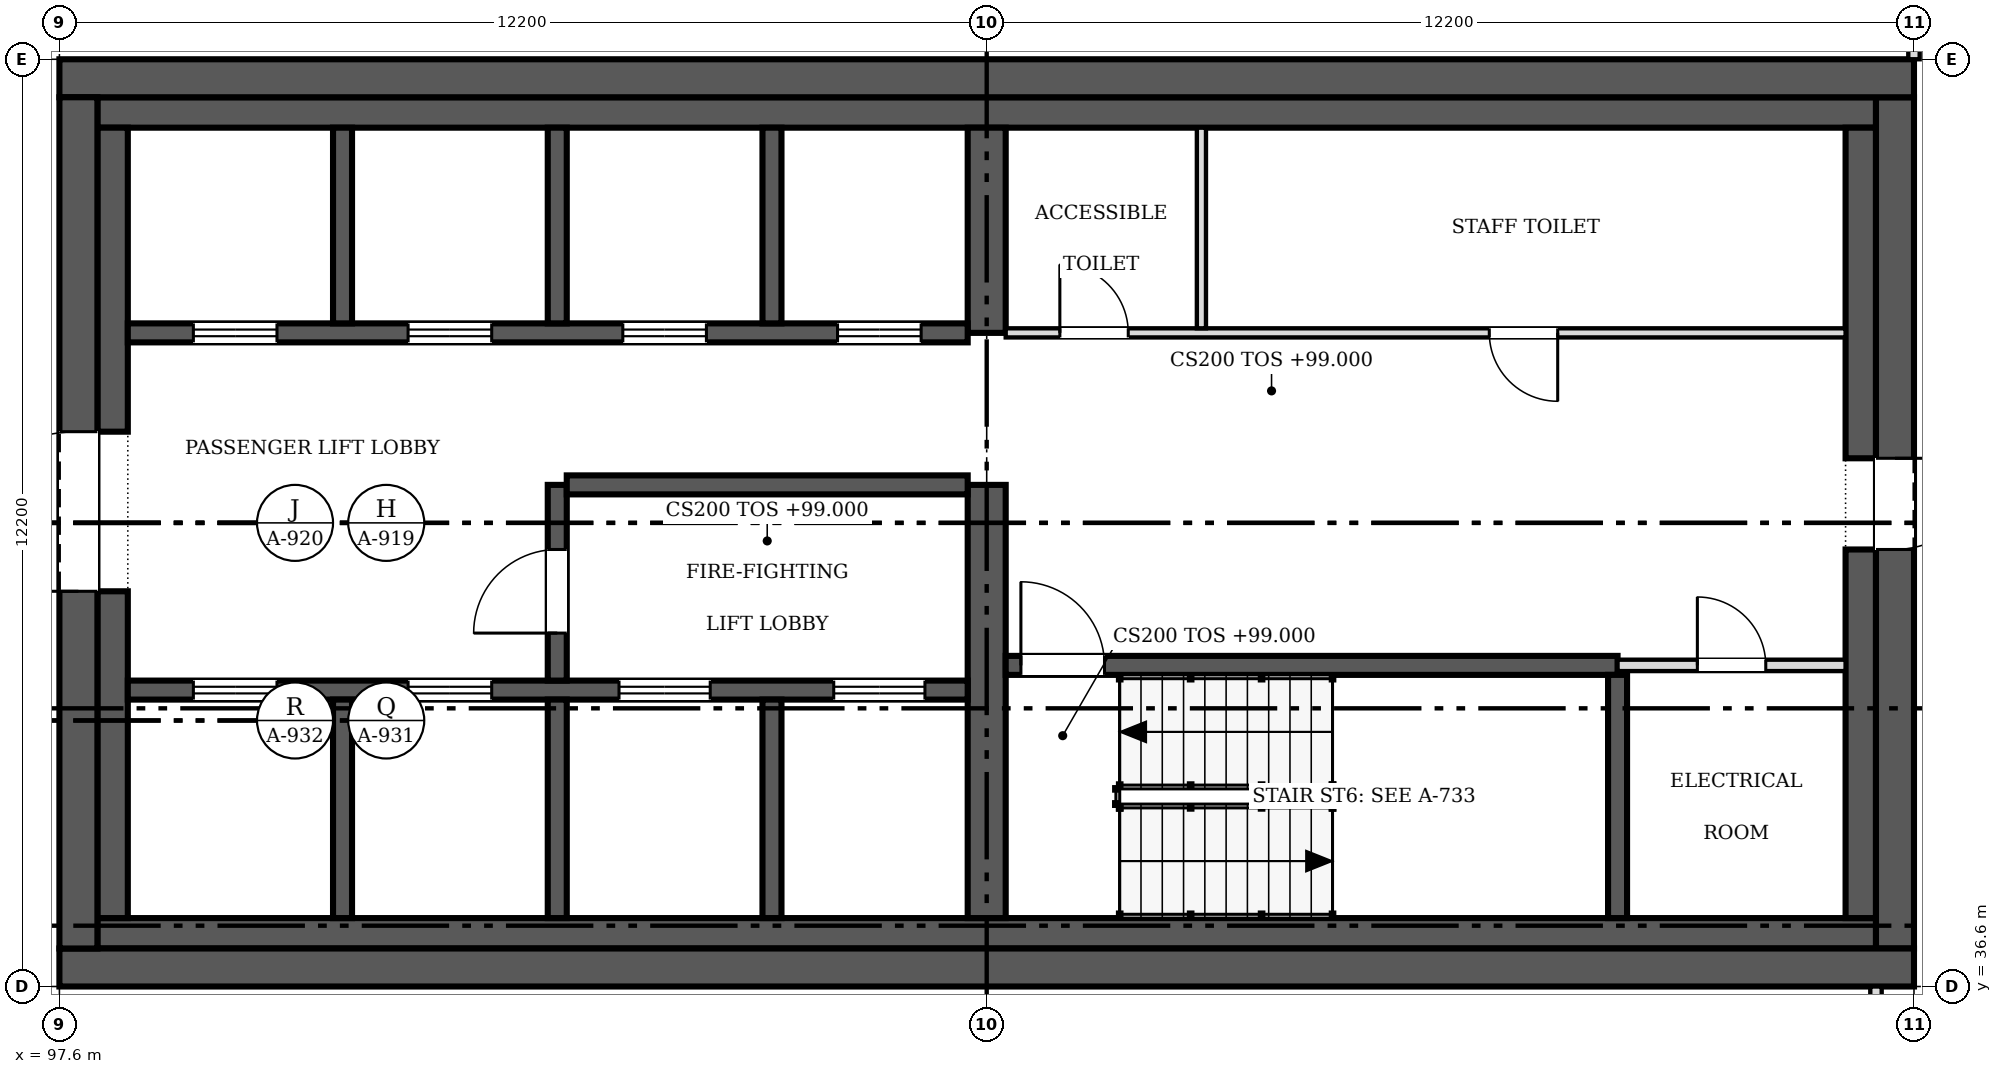
"""IFC4 building model, lengths in metres.
Left out: names, types, materials, properties, quantities, classifications, styles, units other than length and angle.
Written with IfcOpenShell. Run it as: python <this file> out.ifc"""

import sys

from ifc_helpers import new_model, si_unit, direction, frame, frame_2d, origin, place, context, subcontext, project, spatial, rectangle, extrude, source, transform, mapped, element, fill, save


model = new_model("IFC4")
c1 = context("Model", 3, precision=1e-05, world=origin(), true_north=direction((0.0, 1.0)))
c2 = subcontext(c1, "Body", "Model", "MODEL_VIEW")
j1 = project(units=[si_unit("LENGTHUNIT", "METRE"), si_unit("PLANEANGLEUNIT", "RADIAN")], contexts=[c1])
p1 = place(None, origin())
s1 = spatial("IfcSite", under=j1, at=p1, CompositionType="ELEMENT")
p2 = place(p1, origin())
s2 = spatial("IfcBuilding", under=s1, at=p2, CompositionType="ELEMENT")
p3 = place(p2, frame((0.0, 0.0, 99.0)))
s3 = spatial("IfcBuildingStorey", under=s2, at=p3, CompositionType="ELEMENT", Elevation=99.0)
p4 = place(p3, frame((122.0, 36.85, 0.0), z_axis=(0.0, 0.0, 1.0), x_axis=(-1.0, 0.0, 0.0)))
e1 = element("IfcWall", 1, at=p4, inside=s3, PredefinedType="SHEAR", context=c2, shape_type="SweptSolid", body=[
    extrude(rectangle(XDim=24.4, YDim=0.5, at=frame_2d((12.2, 0.0))), origin(), (0.0, 0.0, 1.0), 3.8),
])
p5 = place(p3, frame((97.85, 37.1, 0.0), z_axis=(0.0, 0.0, 1.0), x_axis=(0.0, 1.0, 0.0)))
e2 = element("IfcWall", 2, at=p5, inside=s3, PredefinedType="SHEAR", context=c2, shape_type="SweptSolid", body=[
    extrude(rectangle(XDim=11.2, YDim=0.5, at=frame_2d((5.6, 0.0))), origin(), (0.0, 0.0, 1.0), 3.8),
])
m1 = source(origin(), c2, "Body", "SweptSolid", [
    extrude(rectangle(XDim=2.1, YDim=2.4, at=frame_2d((1.05, 1.2))), frame((0.0, 0.26, 0.0), z_axis=(0.0, -1.0, 0.0), x_axis=(1.0, 0.0, 0.0)), (0.0, 0.0, 1.0), 0.52),
])
p6 = place(p5, frame((4.7, 0.0, 0.0)))
e3 = element("IfcOpeningElement", 3, at=p6, cuts=e2, PredefinedType="OPENING", context=c2, shape_type="MappedRepresentation", body=[
    mapped(m1, transform((0.0, 0.0, 0.0), scale=1.0)),
])
p7 = place(p3, frame((97.6, 48.55, 0.0), z_axis=(0.0, 0.0, 1.0), x_axis=(1.0, 0.0, 0.0)))
e4 = element("IfcWall", 4, at=p7, inside=s3, PredefinedType="SHEAR", context=c2, shape_type="SweptSolid", body=[
    extrude(rectangle(XDim=24.4, YDim=0.5, at=frame_2d((12.2, 0.0))), origin(), (0.0, 0.0, 1.0), 3.8),
])
p8 = place(p3, frame((121.75, 48.3, 0.0), z_axis=(0.0, 0.0, 1.0), x_axis=(0.0, -1.0, 0.0)))
e5 = element("IfcWall", 5, at=p8, inside=s3, PredefinedType="SHEAR", context=c2, shape_type="SweptSolid", body=[
    extrude(rectangle(XDim=11.2, YDim=0.5, at=frame_2d((5.6, 0.0))), origin(), (0.0, 0.0, 1.0), 3.8),
])
m2 = source(origin(), c2, "Body", "SweptSolid", [
    extrude(rectangle(XDim=1.2, YDim=2.1, at=frame_2d((0.6, 1.05))), frame((0.0, 0.26, 0.0), z_axis=(0.0, -1.0, 0.0), x_axis=(1.0, 0.0, 0.0)), (0.0, 0.0, 1.0), 0.52),
])
p9 = place(p8, frame((4.75, 0.0, 0.0)))
e6 = element("IfcOpeningElement", 6, at=p9, cuts=e5, PredefinedType="OPENING", context=c2, shape_type="MappedRepresentation", body=[
    mapped(m2, transform((0.0, 0.0, 0.0), scale=1.0)),
])
for number, where, z_axis, x_axis in (
    (7, (98.1, 37.3, 0.0), (0.0, 0.0, 1.0), (1.0, 0.0, 0.0)),
    (8, (98.1, 48.1, 0.0), (0.0, 0.0, 1.0), (1.0, 0.0, 0.0)),
):
    element("IfcWall", number, at=place(p3, frame(where, z_axis=z_axis, x_axis=x_axis)), inside=s3, PredefinedType="SOLIDWALL", context=c2, shape_type="SweptSolid", body=[
        extrude(rectangle(XDim=23.4, YDim=0.4, at=frame_2d((11.7, 0.0))), origin(), (0.0, 0.0, 1.0), 3.8),
    ])
p10 = place(p3, frame((98.3, 37.5, 0.0), z_axis=(0.0, 0.0, 1.0), x_axis=(0.0, 1.0, 0.0)))
e9 = element("IfcWall", 9, at=p10, inside=s3, PredefinedType="SOLIDWALL", context=c2, shape_type="SweptSolid", body=[
    extrude(rectangle(XDim=4.3, YDim=0.4, at=frame_2d((2.15, 0.0))), origin(), (0.0, 0.0, 1.0), 3.8),
])
p11 = place(p3, frame((98.3, 43.9, 0.0), z_axis=(0.0, 0.0, 1.0), x_axis=(0.0, 1.0, 0.0)))
e10 = element("IfcWall", 10, at=p11, inside=s3, PredefinedType="SOLIDWALL", context=c2, shape_type="SweptSolid", body=[
    extrude(rectangle(XDim=4.0, YDim=0.4, at=frame_2d((2.0, 0.0))), origin(), (0.0, 0.0, 1.0), 3.8),
])
p12 = place(p3, frame((121.3, 37.5, 0.0), z_axis=(0.0, 0.0, 1.0), x_axis=(0.0, 1.0, 0.0)))
e11 = element("IfcWall", 11, at=p12, inside=s3, PredefinedType="SOLIDWALL", context=c2, shape_type="SweptSolid", body=[
    extrude(rectangle(XDim=4.85, YDim=0.4, at=frame_2d((2.425, 0.0))), origin(), (0.0, 0.0, 1.0), 3.8),
])
p13 = place(p3, frame((121.3, 43.55, 0.0), z_axis=(0.0, 0.0, 1.0), x_axis=(0.0, 1.0, 0.0)))
e12 = element("IfcWall", 12, at=p13, inside=s3, PredefinedType="SOLIDWALL", context=c2, shape_type="SweptSolid", body=[
    extrude(rectangle(XDim=4.35, YDim=0.4, at=frame_2d((2.175, 0.0))), origin(), (0.0, 0.0, 1.0), 3.8),
])
p14 = place(p3, frame((109.8, 37.5, 0.0), z_axis=(0.0, 0.0, 1.0), x_axis=(0.0, 1.0, 0.0)))
e13 = element("IfcWall", 13, at=p14, inside=s3, PredefinedType="SHEAR", context=c2, shape_type="SweptSolid", body=[
    extrude(rectangle(XDim=5.7, YDim=0.5, at=frame_2d((2.85, 0.0))), origin(), (0.0, 0.0, 1.0), 3.8),
])
p15 = place(p3, frame((109.8, 45.2, 0.0), z_axis=(0.0, 0.0, 1.0), x_axis=(0.0, 1.0, 0.0)))
e14 = element("IfcWall", 14, at=p15, inside=s3, PredefinedType="SHEAR", context=c2, shape_type="SweptSolid", body=[
    extrude(rectangle(XDim=2.7, YDim=0.5, at=frame_2d((1.35, 0.0))), origin(), (0.0, 0.0, 1.0), 3.8),
])
p16 = place(p3, frame((98.5, 40.5, 0.0), z_axis=(0.0, 0.0, 1.0), x_axis=(1.0, 0.0, 0.0)))
e15 = element("IfcWall", 15, at=p16, inside=s3, PredefinedType="SOLIDWALL", context=c2, shape_type="SweptSolid", body=[
    extrude(rectangle(XDim=11.05, YDim=0.25, at=frame_2d((5.525, 0.0))), origin(), (0.0, 0.0, 1.0), 3.8),
])
m3 = source(origin(), c2, "Body", "SweptSolid", [
    extrude(rectangle(XDim=1.1, YDim=2.1, at=frame_2d((0.55, 1.05))), frame((0.0, 0.135, 0.0), z_axis=(0.0, -1.0, 0.0), x_axis=(1.0, 0.0, 0.0)), (0.0, 0.0, 1.0), 0.27),
])
p17 = place(p16, frame((0.863, 0.0, 0.0)))
e16 = element("IfcOpeningElement", 16, at=p17, cuts=e15, PredefinedType="OPENING", context=c2, shape_type="MappedRepresentation", body=[
    mapped(m3, transform((0.0, 0.0, 0.0), scale=1.0)),
])
p18 = place(p16, frame((3.688, 0.0, 0.0)))
e17 = element("IfcOpeningElement", 17, at=p18, cuts=e15, PredefinedType="OPENING", context=c2, shape_type="MappedRepresentation", body=[
    mapped(m3, transform((0.0, 0.0, 0.0), scale=1.0)),
])
m4 = source(origin(), c2, "Body", "SweptSolid", [
    extrude(rectangle(XDim=1.2, YDim=2.1, at=frame_2d((0.6, 1.05))), frame((0.0, 0.135, 0.0), z_axis=(0.0, -1.0, 0.0), x_axis=(1.0, 0.0, 0.0)), (0.0, 0.0, 1.0), 0.27),
])
p19 = place(p16, frame((6.462, 0.0, 0.0)))
e18 = element("IfcOpeningElement", 18, at=p19, cuts=e15, PredefinedType="OPENING", context=c2, shape_type="MappedRepresentation", body=[
    mapped(m4, transform((0.0, 0.0, 0.0), scale=1.0)),
])
p20 = place(p16, frame((9.288, 0.0, 0.0)))
e19 = element("IfcOpeningElement", 19, at=p20, cuts=e15, PredefinedType="OPENING", context=c2, shape_type="MappedRepresentation", body=[
    mapped(m4, transform((0.0, 0.0, 0.0), scale=1.0)),
])
p21 = place(p3, frame((109.55, 45.2, 0.0), z_axis=(0.0, 0.0, 1.0), x_axis=(-1.0, 0.0, 0.0)))
e20 = element("IfcWall", 20, at=p21, inside=s3, PredefinedType="SOLIDWALL", context=c2, shape_type="SweptSolid", body=[
    extrude(rectangle(XDim=11.05, YDim=0.25, at=frame_2d((5.525, 0.0))), origin(), (0.0, 0.0, 1.0), 3.8),
])
p22 = place(p21, frame((9.087, 0.0, 0.0)))
e21 = element("IfcOpeningElement", 21, at=p22, cuts=e20, PredefinedType="OPENING", context=c2, shape_type="MappedRepresentation", body=[
    mapped(m3, transform((0.0, 0.0, 0.0), scale=1.0)),
])
p23 = place(p21, frame((6.262, 0.0, 0.0)))
e22 = element("IfcOpeningElement", 22, at=p23, cuts=e20, PredefinedType="OPENING", context=c2, shape_type="MappedRepresentation", body=[
    mapped(m3, transform((0.0, 0.0, 0.0), scale=1.0)),
])
p24 = place(p21, frame((3.438, 0.0, 0.0)))
e23 = element("IfcOpeningElement", 23, at=p24, cuts=e20, PredefinedType="OPENING", context=c2, shape_type="MappedRepresentation", body=[
    mapped(m3, transform((0.0, 0.0, 0.0), scale=1.0)),
])
p25 = place(p21, frame((0.613, 0.0, 0.0)))
e24 = element("IfcOpeningElement", 24, at=p25, cuts=e20, PredefinedType="OPENING", context=c2, shape_type="MappedRepresentation", body=[
    mapped(m3, transform((0.0, 0.0, 0.0), scale=1.0)),
])
p26 = place(p3, frame((118.1, 40.825, 0.0), z_axis=(0.0, 0.0, 1.0), x_axis=(-1.0, 0.0, 0.0)))
e25 = element("IfcWall", 25, at=p26, inside=s3, PredefinedType="SOLIDWALL", context=c2, shape_type="SweptSolid", body=[
    extrude(rectangle(XDim=8.05, YDim=0.25, at=frame_2d((4.025, 0.0))), origin(), (0.0, 0.0, 1.0), 3.8),
])
p27 = place(p26, frame((6.75, 0.0, 0.0)))
e26 = element("IfcOpeningElement", 26, at=p27, cuts=e25, PredefinedType="OPENING", context=c2, shape_type="MappedRepresentation", body=[
    mapped(m3, transform((0.0, 0.0, 0.0), scale=1.0)),
])
p28 = place(p3, frame((104.15, 37.5, 0.0), z_axis=(0.0, 0.0, 1.0), x_axis=(0.0, 1.0, 0.0)))
e27 = element("IfcWall", 27, at=p28, inside=s3, PredefinedType="SOLIDWALL", context=c2, shape_type="SweptSolid", body=[
    extrude(rectangle(XDim=2.875, YDim=0.25, at=frame_2d((1.438, 0.0))), origin(), (0.0, 0.0, 1.0), 3.8),
])
p29 = place(p3, frame((104.15, 43.2, 0.0), z_axis=(0.0, 0.0, 1.0), x_axis=(0.0, -1.0, 0.0)))
e28 = element("IfcWall", 28, at=p29, inside=s3, PredefinedType="SOLIDWALL", context=c2, shape_type="SweptSolid", body=[
    extrude(rectangle(XDim=2.575, YDim=0.25, at=frame_2d((1.288, 0.0))), origin(), (0.0, 0.0, 1.0), 3.8),
])
p30 = place(p29, frame((0.85, 0.0, 0.0)))
e29 = element("IfcOpeningElement", 29, at=p30, cuts=e28, PredefinedType="OPENING", context=c2, shape_type="MappedRepresentation", body=[
    mapped(m3, transform((0.0, 0.0, 0.0), scale=1.0)),
])
p31 = place(p3, frame((104.275, 43.2, 0.0), z_axis=(0.0, 0.0, 1.0), x_axis=(1.0, 0.0, 0.0)))
e30 = element("IfcWall", 30, at=p31, inside=s3, PredefinedType="SOLIDWALL", context=c2, shape_type="SweptSolid", body=[
    extrude(rectangle(XDim=5.275, YDim=0.25, at=frame_2d((2.638, 0.0))), origin(), (0.0, 0.0, 1.0), 3.8),
])
p32 = place(p3, frame((118.1, 37.5, 0.0), z_axis=(0.0, 0.0, 1.0), x_axis=(0.0, 1.0, 0.0)))
e31 = element("IfcWall", 31, at=p32, inside=s3, PredefinedType="SOLIDWALL", context=c2, shape_type="SweptSolid", body=[
    extrude(rectangle(XDim=3.2, YDim=0.25, at=frame_2d((1.6, 0.0))), origin(), (0.0, 0.0, 1.0), 3.8),
])
for number, where, z_axis, x_axis in (
    (32, (101.325, 37.5, 0.0), (0.0, 0.0, 1.0), (0.0, 1.0, 0.0)),
    (33, (106.975, 37.5, 0.0), (0.0, 0.0, 1.0), (0.0, 1.0, 0.0)),
):
    element("IfcWall", number, at=place(p3, frame(where, z_axis=z_axis, x_axis=x_axis)), inside=s3, PredefinedType="SOLIDWALL", context=c2, shape_type="SweptSolid", body=[
        extrude(rectangle(XDim=2.875, YDim=0.25, at=frame_2d((1.438, 0.0))), origin(), (0.0, 0.0, 1.0), 3.8),
    ])
for number, where, z_axis, x_axis in (
    (34, (101.325, 45.325, 0.0), (0.0, 0.0, 1.0), (0.0, 1.0, 0.0)),
    (35, (104.15, 45.325, 0.0), (0.0, 0.0, 1.0), (0.0, 1.0, 0.0)),
    (36, (106.975, 45.325, 0.0), (0.0, 0.0, 1.0), (0.0, 1.0, 0.0)),
):
    element("IfcWall", number, at=place(p3, frame(where, z_axis=z_axis, x_axis=x_axis)), inside=s3, PredefinedType="SOLIDWALL", context=c2, shape_type="SweptSolid", body=[
        extrude(rectangle(XDim=2.575, YDim=0.25, at=frame_2d((1.288, 0.0))), origin(), (0.0, 0.0, 1.0), 3.8),
    ])
p33 = place(p3, frame((110.05, 45.2, 0.0), z_axis=(0.0, 0.0, 1.0), x_axis=(1.0, 0.0, 0.0)))
e37 = element("IfcWall", 37, at=p33, inside=s3, PredefinedType="PARTITIONING", context=c2, shape_type="SweptSolid", body=[
    extrude(rectangle(XDim=11.05, YDim=0.12, at=frame_2d((5.525, 0.0))), origin(), (0.0, 0.0, 1.0), 3.6),
])
m5 = source(origin(), c2, "Body", "SweptSolid", [
    extrude(rectangle(XDim=0.9, YDim=2.1, at=frame_2d((0.45, 1.05))), frame((0.0, 0.07, 0.0), z_axis=(0.0, -1.0, 0.0), x_axis=(1.0, 0.0, 0.0)), (0.0, 0.0, 1.0), 0.14),
])
p34 = place(p33, frame((0.712, 0.0, 0.0)))
e38 = element("IfcOpeningElement", 38, at=p34, cuts=e37, PredefinedType="OPENING", context=c2, shape_type="MappedRepresentation", body=[
    mapped(m5, transform((0.0, 0.0, 0.0), scale=1.0)),
])
p35 = place(p33, frame((6.363, 0.0, 0.0)))
e39 = element("IfcOpeningElement", 39, at=p35, cuts=e37, PredefinedType="OPENING", context=c2, shape_type="MappedRepresentation", body=[
    mapped(m5, transform((0.0, 0.0, 0.0), scale=1.0)),
])
p36 = place(p3, frame((121.1, 40.825, 0.0), z_axis=(0.0, 0.0, 1.0), x_axis=(-1.0, 0.0, 0.0)))
e40 = element("IfcWall", 40, at=p36, inside=s3, PredefinedType="PARTITIONING", context=c2, shape_type="SweptSolid", body=[
    extrude(rectangle(XDim=3.0, YDim=0.15, at=frame_2d((1.5, 0.0))), origin(), (0.0, 0.0, 1.0), 3.6),
])
m6 = source(origin(), c2, "Body", "SweptSolid", [
    extrude(rectangle(XDim=0.9, YDim=2.1, at=frame_2d((0.45, 1.05))), frame((0.0, 0.085, 0.0), z_axis=(0.0, -1.0, 0.0), x_axis=(1.0, 0.0, 0.0)), (0.0, 0.0, 1.0), 0.17),
])
p37 = place(p36, frame((1.05, 0.0, 0.0)))
e41 = element("IfcOpeningElement", 41, at=p37, cuts=e40, PredefinedType="OPENING", context=c2, shape_type="MappedRepresentation", body=[
    mapped(m6, transform((0.0, 0.0, 0.0), scale=1.0)),
])
p38 = place(p3, frame((112.625, 45.26, 0.0), z_axis=(0.0, 0.0, 1.0), x_axis=(0.0, 1.0, 0.0)))
e42 = element("IfcWall", 42, at=p38, inside=s3, PredefinedType="PARTITIONING", context=c2, shape_type="SweptSolid", body=[
    extrude(rectangle(XDim=2.64, YDim=0.12, at=frame_2d((1.32, 0.0))), origin(), (0.0, 0.0, 1.0), 3.6),
])
p39 = place(p3, frame((121.5, 36.6, 0.0), z_axis=(0.0, 0.0, 1.0), x_axis=(0.0, -1.0, 0.0)))
e43 = element("IfcWall", 43, at=p39, inside=s3, PredefinedType="PARTITIONING", context=c2, shape_type="SweptSolid", body=[
    extrude(rectangle(XDim=2.524, YDim=0.15, at=frame_2d((1.262, 0.0))), origin(), (0.0, 0.0, 1.0), 3.067),
])
m7 = source(origin(), c2, "Body", "SweptSolid", [
    extrude(rectangle(XDim=1.0, YDim=2.1, at=frame_2d((0.5, 1.05))), frame((0.0, 0.085, 0.0), z_axis=(0.0, -1.0, 0.0), x_axis=(1.0, 0.0, 0.0)), (0.0, 0.0, 1.0), 0.17),
])
p40 = place(p39, frame((0.724, 0.0, 0.0)))
e44 = element("IfcOpeningElement", 44, at=p40, cuts=e43, PredefinedType="OPENING", context=c2, shape_type="MappedRepresentation", body=[
    mapped(m7, transform((0.0, 0.0, 0.0), scale=1.0)),
])
p41 = place(p3, frame((122.0, 48.8, 0.0), z_axis=(0.0, 0.0, 1.0), x_axis=(0.0, 1.0, 0.0)))
e45 = element("IfcWall", 45, at=p41, inside=s3, PredefinedType="PARTITIONING", context=c2, shape_type="SweptSolid", body=[
    extrude(rectangle(XDim=2.324, YDim=0.15, at=frame_2d((1.162, 0.0))), origin(), (0.0, 0.0, 1.0), 3.067),
])
m8 = source(origin(), c2, "Body", "SweptSolid", [
    extrude(rectangle(XDim=2.1, YDim=2.4, at=frame_2d((1.05, 1.2))), frame((0.0, 0.025, 0.0), z_axis=(0.0, -1.0, 0.0), x_axis=(1.0, 0.0, 0.0)), (0.0, 0.0, 1.0), 0.05),
])
p42 = place(p6, origin())
e46 = element("IfcDoor", 46, at=p42, inside=s3, OperationType="DOUBLE_DOOR_SINGLE_SWING", PredefinedType="DOOR", context=c2, shape_type="MappedRepresentation", body=[
    mapped(m8, transform((0.0, 0.0, 0.0), scale=1.0)),
])
fill(e3, e46)
m9 = source(origin(), c2, "Body", "SweptSolid", [
    extrude(rectangle(XDim=1.2, YDim=2.1, at=frame_2d((0.6, 1.05))), frame((0.0, 0.025, 0.0), z_axis=(0.0, -1.0, 0.0), x_axis=(1.0, 0.0, 0.0)), (0.0, 0.0, 1.0), 0.05),
])
p43 = place(p9, origin())
e47 = element("IfcDoor", 47, at=p43, inside=s3, OperationType="SINGLE_SWING_LEFT", PredefinedType="DOOR", context=c2, shape_type="MappedRepresentation", body=[
    mapped(m9, transform((0.0, 0.0, 0.0), scale=1.0)),
])
fill(e6, e47)
m10 = source(origin(), c2, "Body", "SweptSolid", [
    extrude(rectangle(XDim=1.1, YDim=2.1, at=frame_2d((0.55, 1.05))), frame((0.0, 0.025, 0.0), z_axis=(0.0, -1.0, 0.0), x_axis=(1.0, 0.0, 0.0)), (0.0, 0.0, 1.0), 0.05),
])
p44 = place(p17, origin())
e48 = element("IfcDoor", 48, at=p44, inside=s3, OperationType="DOUBLE_DOOR_SLIDING", PredefinedType="DOOR", context=c2, shape_type="MappedRepresentation", body=[
    mapped(m10, transform((0.0, 0.0, 0.0), scale=1.0)),
])
fill(e16, e48)
p45 = place(p18, origin())
e49 = element("IfcDoor", 49, at=p45, inside=s3, OperationType="DOUBLE_DOOR_SLIDING", PredefinedType="DOOR", context=c2, shape_type="MappedRepresentation", body=[
    mapped(m10, transform((0.0, 0.0, 0.0), scale=1.0)),
])
fill(e17, e49)
p46 = place(p19, origin())
e50 = element("IfcDoor", 50, at=p46, inside=s3, OperationType="DOUBLE_DOOR_SLIDING", PredefinedType="DOOR", context=c2, shape_type="MappedRepresentation", body=[
    mapped(m9, transform((0.0, 0.0, 0.0), scale=1.0)),
])
fill(e18, e50)
p47 = place(p20, origin())
e51 = element("IfcDoor", 51, at=p47, inside=s3, OperationType="DOUBLE_DOOR_SLIDING", PredefinedType="DOOR", context=c2, shape_type="MappedRepresentation", body=[
    mapped(m9, transform((0.0, 0.0, 0.0), scale=1.0)),
])
fill(e19, e51)
p48 = place(p22, origin())
e52 = element("IfcDoor", 52, at=p48, inside=s3, OperationType="DOUBLE_DOOR_SLIDING", PredefinedType="DOOR", context=c2, shape_type="MappedRepresentation", body=[
    mapped(m10, transform((0.0, 0.0, 0.0), scale=1.0)),
])
fill(e21, e52)
p49 = place(p23, origin())
e53 = element("IfcDoor", 53, at=p49, inside=s3, OperationType="DOUBLE_DOOR_SLIDING", PredefinedType="DOOR", context=c2, shape_type="MappedRepresentation", body=[
    mapped(m10, transform((0.0, 0.0, 0.0), scale=1.0)),
])
fill(e22, e53)
p50 = place(p24, origin())
e54 = element("IfcDoor", 54, at=p50, inside=s3, OperationType="DOUBLE_DOOR_SLIDING", PredefinedType="DOOR", context=c2, shape_type="MappedRepresentation", body=[
    mapped(m10, transform((0.0, 0.0, 0.0), scale=1.0)),
])
fill(e23, e54)
p51 = place(p25, origin())
e55 = element("IfcDoor", 55, at=p51, inside=s3, OperationType="DOUBLE_DOOR_SLIDING", PredefinedType="DOOR", context=c2, shape_type="MappedRepresentation", body=[
    mapped(m10, transform((0.0, 0.0, 0.0), scale=1.0)),
])
fill(e24, e55)
p52 = place(p27, origin())
e56 = element("IfcDoor", 56, at=p52, inside=s3, OperationType="SINGLE_SWING_RIGHT", PredefinedType="DOOR", context=c2, shape_type="MappedRepresentation", body=[
    mapped(m10, transform((0.0, 0.0, 0.0), scale=1.0)),
])
fill(e26, e56)
p53 = place(p30, origin())
e57 = element("IfcDoor", 57, at=p53, inside=s3, OperationType="SINGLE_SWING_RIGHT", PredefinedType="DOOR", context=c2, shape_type="MappedRepresentation", body=[
    mapped(m10, transform((0.0, 0.0, 0.0), scale=1.0)),
])
fill(e29, e57)
m11 = source(origin(), c2, "Body", "SweptSolid", [
    extrude(rectangle(XDim=0.9, YDim=2.1, at=frame_2d((0.45, 1.05))), frame((0.0, 0.025, 0.0), z_axis=(0.0, -1.0, 0.0), x_axis=(1.0, 0.0, 0.0)), (0.0, 0.0, 1.0), 0.05),
])
p54 = place(p34, origin())
e58 = element("IfcDoor", 58, at=p54, inside=s3, OperationType="SINGLE_SWING_LEFT", PredefinedType="DOOR", context=c2, shape_type="MappedRepresentation", body=[
    mapped(m11, transform((0.0, 0.0, 0.0), scale=1.0)),
])
fill(e38, e58)
p55 = place(p35, origin())
e59 = element("IfcDoor", 59, at=p55, inside=s3, OperationType="SINGLE_SWING_RIGHT", PredefinedType="DOOR", context=c2, shape_type="MappedRepresentation", body=[
    mapped(m11, transform((0.0, 0.0, 0.0), scale=1.0)),
])
fill(e39, e59)
p56 = place(p37, origin())
e60 = element("IfcDoor", 60, at=p56, inside=s3, OperationType="SINGLE_SWING_RIGHT", PredefinedType="DOOR", context=c2, shape_type="MappedRepresentation", body=[
    mapped(m11, transform((0.0, 0.0, 0.0), scale=1.0)),
])
fill(e41, e60)
save(model, sys.argv[1])
